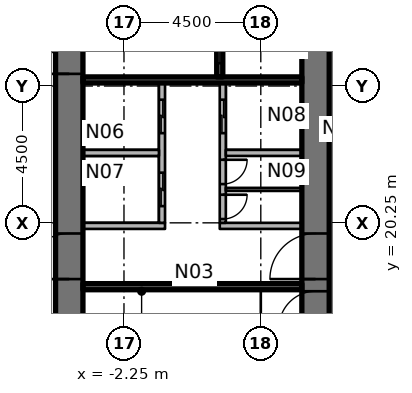
"""IFC4 building model, lengths in metres.
Left out: names, types, materials, properties, quantities, classifications, styles, units other than length and angle.
Written with IfcOpenShell. Run it as: python <this file> out.ifc"""

import sys

from ifc_helpers import new_model, si_unit, direction, frame, frame_2d, origin, place, context, subcontext, project, spatial, rectangle, extrude, element, fill, save


model = new_model("IFC4")
c1 = context("Model", 3, precision=1e-05, world=origin(), true_north=direction((0.0, 1.0)))
c2 = subcontext(c1, "Body", "Model", "MODEL_VIEW")
j1 = project(units=[si_unit("LENGTHUNIT", "METRE"), si_unit("PLANEANGLEUNIT", "RADIAN")], contexts=[c1])
p1 = place(None, origin())
s1 = spatial("IfcSite", under=j1, at=p1, CompositionType="ELEMENT")
p2 = place(p1, origin())
s2 = spatial("IfcBuilding", under=s1, at=p2, CompositionType="ELEMENT")
p3 = place(p2, frame((0.0, 0.0, 17.0)))
s3 = spatial("IfcBuildingStorey", under=s2, at=p3, CompositionType="ELEMENT", Elevation=17.0)
p4 = place(p3, frame((-4.05, 11.25, 0.0), z_axis=(0.0, 0.0, 1.0), x_axis=(0.0, 1.0, 0.0)))
e1 = element("IfcWall", 1, at=p4, inside=s3, PredefinedType="SHEAR", context=c2, shape_type="SweptSolid", body=[
    extrude(rectangle(XDim=15.0, YDim=0.9, at=frame_2d((7.5, 0.0))), origin(), (0.0, 0.0, 1.0), 5.0),
])
p5 = place(p4, frame((7.15, 0.0, 0.0)))
e2 = element("IfcOpeningElement", 2, at=p5, cuts=e1, PredefinedType="OPENING", context=c2, shape_type="SweptSolid", body=[
    extrude(rectangle(XDim=1.5, YDim=2.3, at=frame_2d((0.75, 1.15))), frame((0.0, 0.46, 0.0), z_axis=(0.0, -1.0, 0.0), x_axis=(1.0, 0.0, 0.0)), (0.0, 0.0, 1.0), 0.92),
])
p6 = place(p4, frame((13.9, 0.0, 0.0)))
e3 = element("IfcOpeningElement", 3, at=p6, cuts=e1, PredefinedType="OPENING", context=c2, shape_type="SweptSolid", body=[
    extrude(rectangle(XDim=0.9, YDim=2.1, at=frame_2d((0.45, 1.05))), frame((0.0, 0.46, 0.0), z_axis=(0.0, -1.0, 0.0), x_axis=(1.0, 0.0, 0.0)), (0.0, 0.0, 1.0), 0.92),
])
p7 = place(p4, frame((1.15, 0.0, 0.0)))
e4 = element("IfcOpeningElement", 4, at=p7, cuts=e1, PredefinedType="OPENING", context=c2, shape_type="SweptSolid", body=[
    extrude(rectangle(XDim=1.2, YDim=2.1, at=frame_2d((0.6, 1.05))), frame((0.0, 0.46, 0.0), z_axis=(0.0, -1.0, 0.0), x_axis=(1.0, 0.0, 0.0)), (0.0, 0.0, 1.0), 0.92),
])
p8 = place(p3, frame((4.05, 11.25, 0.0), z_axis=(0.0, 0.0, 1.0), x_axis=(0.0, 1.0, 0.0)))
e5 = element("IfcWall", 5, at=p8, inside=s3, PredefinedType="SHEAR", context=c2, shape_type="SweptSolid", body=[
    extrude(rectangle(XDim=15.0, YDim=0.9, at=frame_2d((7.5, 0.0))), origin(), (0.0, 0.0, 1.0), 5.0),
])
p9 = place(p8, frame((7.15, 0.0, 0.0)))
e6 = element("IfcOpeningElement", 6, at=p9, cuts=e5, PredefinedType="OPENING", context=c2, shape_type="SweptSolid", body=[
    extrude(rectangle(XDim=1.5, YDim=2.3, at=frame_2d((0.75, 1.15))), frame((0.0, 0.46, 0.0), z_axis=(0.0, -1.0, 0.0), x_axis=(1.0, 0.0, 0.0)), (0.0, 0.0, 1.0), 0.92),
])
p10 = place(p8, frame((5.55, 0.0, 0.0)))
e7 = element("IfcOpeningElement", 7, at=p10, cuts=e5, PredefinedType="OPENING", context=c2, shape_type="SweptSolid", body=[
    extrude(rectangle(XDim=1.2, YDim=2.1, at=frame_2d((0.6, 1.05))), frame((0.0, 0.46, 0.0), z_axis=(0.0, -1.0, 0.0), x_axis=(1.0, 0.0, 0.0)), (0.0, 0.0, 1.0), 0.92),
])
p11 = place(p3, frame((-3.6, 24.95, 0.0), z_axis=(0.0, 0.0, 1.0), x_axis=(1.0, 0.0, 0.0)))
e8 = element("IfcWall", 8, at=p11, inside=s3, PredefinedType="SHEAR", context=c2, shape_type="SweptSolid", body=[
    extrude(rectangle(XDim=7.2, YDim=0.2, at=frame_2d((3.6, 0.0))), origin(), (0.0, 0.0, 1.0), 4.55),
])
p12 = place(p3, frame((0.9, 27.3, 0.0), z_axis=(0.0, 0.0, 1.0), x_axis=(0.0, -1.0, 0.0)))
e9 = element("IfcWall", 9, at=p12, inside=s3, PredefinedType="SHEAR", context=c2, shape_type="SweptSolid", body=[
    extrude(rectangle(XDim=2.25, YDim=0.2, at=frame_2d((1.125, 0.0))), origin(), (0.0, 0.0, 1.0), 4.55),
])
p13 = place(p12, frame((0.7, 0.0, 0.0)))
e10 = element("IfcOpeningElement", 10, at=p13, cuts=e9, PredefinedType="OPENING", context=c2, shape_type="SweptSolid", body=[
    extrude(rectangle(XDim=1.1, YDim=2.3, at=frame_2d((0.55, 1.15))), frame((0.0, 0.11, 0.0), z_axis=(0.0, -1.0, 0.0), x_axis=(1.0, 0.0, 0.0)), (0.0, 0.0, 1.0), 0.22),
])
p14 = place(p3, frame((-3.6, 18.15, 0.0), z_axis=(0.0, 0.0, 1.0), x_axis=(1.0, 0.0, 0.0)))
e11 = element("IfcWall", 11, at=p14, inside=s3, PredefinedType="SHEAR", context=c2, shape_type="SweptSolid", body=[
    extrude(rectangle(XDim=7.2, YDim=0.2, at=frame_2d((3.6, 0.0))), origin(), (0.0, 0.0, 1.0), 4.55),
])
p15 = place(p3, frame((-3.6, 20.15, 0.0), z_axis=(0.0, 0.0, 1.0), x_axis=(1.0, 0.0, 0.0)))
e12 = element("IfcWall", 12, at=p15, inside=s3, PredefinedType="PARTITIONING", context=c2, shape_type="SweptSolid", body=[
    extrude(rectangle(XDim=2.7, YDim=0.2, at=frame_2d((1.35, 0.0))), origin(), (0.0, 0.0, 1.0), 4.55),
])
p16 = place(p3, frame((-1.0, 24.85, 0.0), z_axis=(0.0, 0.0, 1.0), x_axis=(0.0, -1.0, 0.0)))
e13 = element("IfcWall", 13, at=p16, inside=s3, PredefinedType="PARTITIONING", context=c2, shape_type="SweptSolid", body=[
    extrude(rectangle(XDim=4.6, YDim=0.2, at=frame_2d((2.3, 0.0))), origin(), (0.0, 0.0, 1.0), 4.55),
])
p17 = place(p16, frame((0.55, 0.0, 0.0)))
e14 = element("IfcOpeningElement", 14, at=p17, cuts=e13, PredefinedType="OPENING", context=c2, shape_type="SweptSolid", body=[
    extrude(rectangle(XDim=1.1, YDim=2.3, at=frame_2d((0.55, 1.15))), frame((0.0, 0.11, 0.0), z_axis=(0.0, -1.0, 0.0), x_axis=(1.0, 0.0, 0.0)), (0.0, 0.0, 1.0), 0.22),
])
p18 = place(p16, frame((2.95, 0.0, 0.0)))
e15 = element("IfcOpeningElement", 15, at=p18, cuts=e13, PredefinedType="OPENING", context=c2, shape_type="SweptSolid", body=[
    extrude(rectangle(XDim=1.1, YDim=2.3, at=frame_2d((0.55, 1.15))), frame((0.0, 0.11, 0.0), z_axis=(0.0, -1.0, 0.0), x_axis=(1.0, 0.0, 0.0)), (0.0, 0.0, 1.0), 0.22),
])
p19 = place(p3, frame((0.9, 20.15, 0.0), z_axis=(0.0, 0.0, 1.0), x_axis=(1.0, 0.0, 0.0)))
e16 = element("IfcWall", 16, at=p19, inside=s3, PredefinedType="PARTITIONING", context=c2, shape_type="SweptSolid", body=[
    extrude(rectangle(XDim=2.7, YDim=0.2, at=frame_2d((1.35, 0.0))), origin(), (0.0, 0.0, 1.0), 4.55),
])
p20 = place(p3, frame((1.0, 24.85, 0.0), z_axis=(0.0, 0.0, 1.0), x_axis=(0.0, -1.0, 0.0)))
e17 = element("IfcWall", 17, at=p20, inside=s3, PredefinedType="PARTITIONING", context=c2, shape_type="SweptSolid", body=[
    extrude(rectangle(XDim=4.6, YDim=0.2, at=frame_2d((2.3, 0.0))), origin(), (0.0, 0.0, 1.0), 4.55),
])
p21 = place(p20, frame((0.55, 0.0, 0.0)))
e18 = element("IfcOpeningElement", 18, at=p21, cuts=e17, PredefinedType="OPENING", context=c2, shape_type="SweptSolid", body=[
    extrude(rectangle(XDim=1.1, YDim=2.3, at=frame_2d((0.55, 1.15))), frame((0.0, 0.11, 0.0), z_axis=(0.0, -1.0, 0.0), x_axis=(1.0, 0.0, 0.0)), (0.0, 0.0, 1.0), 0.22),
])
p22 = place(p20, frame((2.525, 0.0, 0.0)))
e19 = element("IfcOpeningElement", 19, at=p22, cuts=e17, PredefinedType="OPENING", context=c2, shape_type="SweptSolid", body=[
    extrude(rectangle(XDim=0.8, YDim=2.1, at=frame_2d((0.4, 1.05))), frame((0.0, 0.11, 0.0), z_axis=(0.0, -1.0, 0.0), x_axis=(1.0, 0.0, 0.0)), (0.0, 0.0, 1.0), 0.22),
])
p23 = place(p20, frame((3.675, 0.0, 0.0)))
e20 = element("IfcOpeningElement", 20, at=p23, cuts=e17, PredefinedType="OPENING", context=c2, shape_type="SweptSolid", body=[
    extrude(rectangle(XDim=0.8, YDim=2.1, at=frame_2d((0.4, 1.05))), frame((0.0, 0.11, 0.0), z_axis=(0.0, -1.0, 0.0), x_axis=(1.0, 0.0, 0.0)), (0.0, 0.0, 1.0), 0.22),
])
for number, where, z_axis, x_axis in (
    (21, (-3.6, 22.55, 0.0), (0.0, 0.0, 1.0), (1.0, 0.0, 0.0)),
    (22, (1.1, 22.55, 0.0), (0.0, 0.0, 1.0), (1.0, 0.0, 0.0)),
):
    element("IfcWall", number, at=place(p3, frame(where, z_axis=z_axis, x_axis=x_axis)), inside=s3, PredefinedType="PARTITIONING", context=c2, shape_type="SweptSolid", body=[
        extrude(rectangle(XDim=2.5, YDim=0.2, at=frame_2d((1.25, 0.0))), origin(), (0.0, 0.0, 1.0), 4.55),
    ])
p24 = place(p3, frame((1.1, 21.35, 0.0), z_axis=(0.0, 0.0, 1.0), x_axis=(1.0, 0.0, 0.0)))
e23 = element("IfcWall", 23, at=p24, inside=s3, PredefinedType="PARTITIONING", context=c2, shape_type="SweptSolid", body=[
    extrude(rectangle(XDim=2.5, YDim=0.1, at=frame_2d((1.25, 0.0))), origin(), (0.0, 0.0, 1.0), 4.55),
])
p25 = place(p5, origin())
e24 = element("IfcDoor", 24, at=p25, inside=s3, OperationType="DOUBLE_DOOR_SINGLE_SWING", PredefinedType="DOOR", context=c2, shape_type="SweptSolid", body=[
    extrude(rectangle(XDim=1.5, YDim=2.3, at=frame_2d((0.75, 1.15))), frame((0.0, 0.025, 0.0), z_axis=(0.0, -1.0, 0.0), x_axis=(1.0, 0.0, 0.0)), (0.0, 0.0, 1.0), 0.05),
])
fill(e2, e24)
p26 = place(p9, origin())
e25 = element("IfcDoor", 25, at=p26, inside=s3, OperationType="DOUBLE_DOOR_SINGLE_SWING", PredefinedType="DOOR", context=c2, shape_type="SweptSolid", body=[
    extrude(rectangle(XDim=1.5, YDim=2.3, at=frame_2d((0.75, 1.15))), frame((0.0, 0.025, 0.0), z_axis=(0.0, -1.0, 0.0), x_axis=(1.0, 0.0, 0.0)), (0.0, 0.0, 1.0), 0.05),
])
fill(e6, e25)
p27 = place(p6, origin())
e26 = element("IfcDoor", 26, at=p27, inside=s3, OperationType="SINGLE_SWING_LEFT", PredefinedType="DOOR", context=c2, shape_type="SweptSolid", body=[
    extrude(rectangle(XDim=0.9, YDim=2.1, at=frame_2d((0.45, 1.05))), frame((0.0, 0.025, 0.0), z_axis=(0.0, -1.0, 0.0), x_axis=(1.0, 0.0, 0.0)), (0.0, 0.0, 1.0), 0.05),
])
fill(e3, e26)
p28 = place(p10, origin())
e27 = element("IfcDoor", 27, at=p28, inside=s3, OperationType="SINGLE_SWING_LEFT", PredefinedType="DOOR", context=c2, shape_type="SweptSolid", body=[
    extrude(rectangle(XDim=1.2, YDim=2.1, at=frame_2d((0.6, 1.05))), frame((0.0, 0.025, 0.0), z_axis=(0.0, -1.0, 0.0), x_axis=(1.0, 0.0, 0.0)), (0.0, 0.0, 1.0), 0.05),
])
fill(e7, e27)
p29 = place(p13, origin())
e28 = element("IfcDoor", 28, at=p29, inside=s3, OperationType="DOUBLE_DOOR_SLIDING", PredefinedType="DOOR", context=c2, shape_type="SweptSolid", body=[
    extrude(rectangle(XDim=1.1, YDim=2.3, at=frame_2d((0.55, 1.15))), frame((0.0, 0.025, 0.0), z_axis=(0.0, -1.0, 0.0), x_axis=(1.0, 0.0, 0.0)), (0.0, 0.0, 1.0), 0.05),
])
fill(e10, e28)
p30 = place(p17, origin())
e29 = element("IfcDoor", 29, at=p30, inside=s3, OperationType="DOUBLE_DOOR_SLIDING", PredefinedType="DOOR", context=c2, shape_type="SweptSolid", body=[
    extrude(rectangle(XDim=1.1, YDim=2.3, at=frame_2d((0.55, 1.15))), frame((0.0, 0.025, 0.0), z_axis=(0.0, -1.0, 0.0), x_axis=(1.0, 0.0, 0.0)), (0.0, 0.0, 1.0), 0.05),
])
fill(e14, e29)
p31 = place(p18, origin())
e30 = element("IfcDoor", 30, at=p31, inside=s3, OperationType="DOUBLE_DOOR_SLIDING", PredefinedType="DOOR", context=c2, shape_type="SweptSolid", body=[
    extrude(rectangle(XDim=1.1, YDim=2.3, at=frame_2d((0.55, 1.15))), frame((0.0, 0.025, 0.0), z_axis=(0.0, -1.0, 0.0), x_axis=(1.0, 0.0, 0.0)), (0.0, 0.0, 1.0), 0.05),
])
fill(e15, e30)
p32 = place(p21, origin())
e31 = element("IfcDoor", 31, at=p32, inside=s3, OperationType="DOUBLE_DOOR_SLIDING", PredefinedType="DOOR", context=c2, shape_type="SweptSolid", body=[
    extrude(rectangle(XDim=1.1, YDim=2.3, at=frame_2d((0.55, 1.15))), frame((0.0, 0.025, 0.0), z_axis=(0.0, -1.0, 0.0), x_axis=(1.0, 0.0, 0.0)), (0.0, 0.0, 1.0), 0.05),
])
fill(e18, e31)
p33 = place(p22, origin())
e32 = element("IfcDoor", 32, at=p33, inside=s3, OperationType="SINGLE_SWING_RIGHT", PredefinedType="DOOR", context=c2, shape_type="SweptSolid", body=[
    extrude(rectangle(XDim=0.8, YDim=2.1, at=frame_2d((0.4, 1.05))), frame((0.0, 0.025, 0.0), z_axis=(0.0, -1.0, 0.0), x_axis=(1.0, 0.0, 0.0)), (0.0, 0.0, 1.0), 0.05),
])
fill(e19, e32)
p34 = place(p23, origin())
e33 = element("IfcDoor", 33, at=p34, inside=s3, OperationType="SINGLE_SWING_RIGHT", PredefinedType="DOOR", context=c2, shape_type="SweptSolid", body=[
    extrude(rectangle(XDim=0.8, YDim=2.1, at=frame_2d((0.4, 1.05))), frame((0.0, 0.025, 0.0), z_axis=(0.0, -1.0, 0.0), x_axis=(1.0, 0.0, 0.0)), (0.0, 0.0, 1.0), 0.05),
])
fill(e20, e33)
save(model, sys.argv[1])
